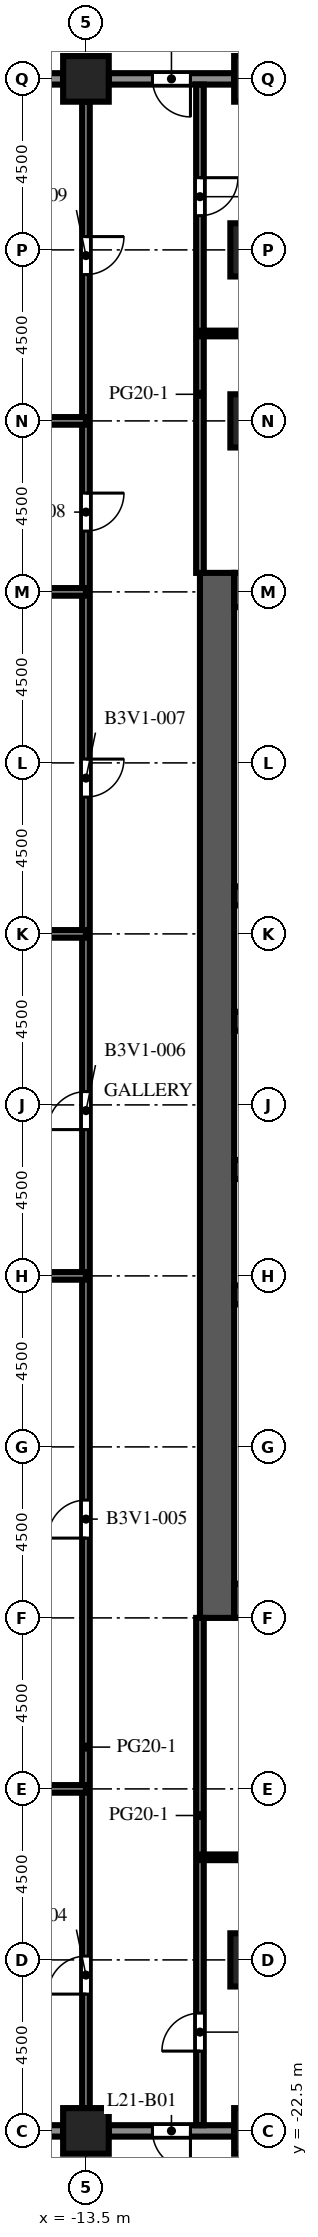
"""IFC4 building model, lengths in metres.
Left out: names, types, materials, properties, quantities, classifications, styles, units other than length and angle.
Written with IfcOpenShell. Run it as: python <this file> out.ifc"""

import sys

from ifc_helpers import new_model, si_unit, direction, frame, frame_2d, origin, origin_2d, place, context, subcontext, project, spatial, rectangle, extrude, element, fill, save


model = new_model("IFC4")
c1 = context("Model", 3, precision=1e-05, world=origin(), true_north=direction((0.0, 1.0)))
c2 = subcontext(c1, "Body", "Model", "MODEL_VIEW")
j1 = project(units=[si_unit("LENGTHUNIT", "METRE"), si_unit("PLANEANGLEUNIT", "RADIAN")], contexts=[c1])
p1 = place(None, origin())
s1 = spatial("IfcSite", under=j1, at=p1, CompositionType="ELEMENT")
p2 = place(p1, origin())
s2 = spatial("IfcBuilding", under=s1, at=p2, CompositionType="ELEMENT")
p3 = place(p2, frame((0.0, 0.0, 94.3)))
s3 = spatial("IfcBuildingStorey", under=s2, at=p3, CompositionType="ELEMENT", Elevation=94.3)
for number, where, z_axis, x_axis in (
    (1, (-13.5, -22.5, 0.0), (0.0, 0.0, 1.0), (1.0, 0.0, 0.0)),
    (2, (-13.5, 31.5, 0.0), (0.0, 0.0, 1.0), (1.0, 0.0, 0.0)),
    (3, (-9.0, -22.5, 0.0), (0.0, 0.0, 1.0), (1.0, 0.0, 0.0)),
    (4, (-9.0, 31.5, 0.0), (0.0, 0.0, 1.0), (1.0, 0.0, 0.0)),
):
    element("IfcColumn", number, at=place(p3, frame(where, z_axis=z_axis, x_axis=x_axis)), inside=s3, PredefinedType="COLUMN", context=c2, shape_type="SweptSolid", body=[
        extrude(rectangle(XDim=1.2, YDim=1.2, at=origin_2d()), origin(), (0.0, 0.0, 1.0), 4.1),
    ])
for number, where, z_axis, x_axis in (
    (5, (-9.0, -18.0, 0.0), (0.0, 0.0, 1.0), (1.0, 0.0, 0.0)),
    (6, (-9.0, 22.5, 0.0), (0.0, 0.0, 1.0), (1.0, 0.0, 0.0)),
    (7, (-9.0, 27.0, 0.0), (0.0, 0.0, 1.0), (1.0, 0.0, 0.0)),
):
    element("IfcColumn", number, at=place(p3, frame(where, z_axis=z_axis, x_axis=x_axis)), inside=s3, PredefinedType="COLUMN", context=c2, shape_type="SweptSolid", body=[
        extrude(rectangle(XDim=1.4, YDim=1.4, at=origin_2d()), origin(), (0.0, 0.0, 1.0), 4.1),
    ])
p4 = place(p3, frame((-10.05, -9.0, 0.0), z_axis=(0.0, 0.0, 1.0), x_axis=(0.0, 1.0, 0.0)))
e8 = element("IfcWall", 8, at=p4, inside=s3, PredefinedType="SHEAR", context=c2, shape_type="SweptSolid", body=[
    extrude(rectangle(XDim=27.5, YDim=0.9, at=frame_2d((13.75, 0.0))), origin(), (0.0, 0.0, 1.0), 4.1),
])
p5 = place(p4, frame((12.55, 0.0, 0.0)))
e9 = element("IfcOpeningElement", 9, at=p5, cuts=e8, PredefinedType="OPENING", context=c2, shape_type="SweptSolid", body=[
    extrude(rectangle(XDim=2.4, YDim=2.4, at=frame_2d((1.2, 1.2))), frame((0.0, 0.46, 0.0), z_axis=(0.0, -1.0, 0.0), x_axis=(1.0, 0.0, 0.0)), (0.0, 0.0, 1.0), 0.92),
])
p6 = place(p4, frame((6.825, 0.0, 0.0)))
e10 = element("IfcOpeningElement", 10, at=p6, cuts=e8, PredefinedType="OPENING", context=c2, shape_type="SweptSolid", body=[
    extrude(rectangle(XDim=1.2, YDim=2.1, at=frame_2d((0.6, 1.05))), frame((0.0, 0.46, 0.0), z_axis=(0.0, -1.0, 0.0), x_axis=(1.0, 0.0, 0.0)), (0.0, 0.0, 1.0), 0.92),
])
p7 = place(p4, frame((19.475, 0.0, 0.0)))
e11 = element("IfcOpeningElement", 11, at=p7, cuts=e8, PredefinedType="OPENING", context=c2, shape_type="SweptSolid", body=[
    extrude(rectangle(XDim=1.2, YDim=2.1, at=frame_2d((0.6, 1.05))), frame((0.0, 0.46, 0.0), z_axis=(0.0, -1.0, 0.0), x_axis=(1.0, 0.0, 0.0)), (0.0, 0.0, 1.0), 0.92),
])
for number, where, z_axis, x_axis in (
    (12, (-9.6, -8.55, 0.0), (0.0, 0.0, 1.0), (1.0, 0.0, 0.0)),
    (13, (-9.6, 18.05, 0.0), (0.0, 0.0, 1.0), (1.0, 0.0, 0.0)),
):
    element("IfcWall", number, at=place(p3, frame(where, z_axis=z_axis, x_axis=x_axis)), inside=s3, PredefinedType="SHEAR", context=c2, shape_type="SweptSolid", body=[
        extrude(rectangle(XDim=10.2, YDim=0.9, at=frame_2d((5.1, 0.0))), origin(), (0.0, 0.0, 1.0), 4.1),
    ])
p8 = place(p3, frame((-9.6, -0.5, 0.0), z_axis=(0.0, 0.0, 1.0), x_axis=(1.0, 0.0, 0.0)))
e14 = element("IfcWall", 14, at=p8, inside=s3, PredefinedType="SHEAR", context=c2, shape_type="SweptSolid", body=[
    extrude(rectangle(XDim=10.2, YDim=0.5, at=frame_2d((5.1, 0.0))), origin(), (0.0, 0.0, 1.0), 4.1),
])
p9 = place(p3, frame((-9.6, 2.8, 0.0), z_axis=(0.0, 0.0, 1.0), x_axis=(1.0, 0.0, 0.0)))
e15 = element("IfcWall", 15, at=p9, inside=s3, PredefinedType="SHEAR", context=c2, shape_type="SweptSolid", body=[
    extrude(rectangle(XDim=10.2, YDim=0.5, at=frame_2d((5.1, 0.0))), origin(), (0.0, 0.0, 1.0), 4.1),
])
p10 = place(p9, frame((0.562, 0.0, 0.0)))
e16 = element("IfcOpeningElement", 16, at=p10, cuts=e15, PredefinedType="OPENING", context=c2, shape_type="SweptSolid", body=[
    extrude(rectangle(XDim=1.1, YDim=2.1, at=frame_2d((0.55, 1.05))), frame((0.0, 0.26, 0.0), z_axis=(0.0, -1.0, 0.0), x_axis=(1.0, 0.0, 0.0)), (0.0, 0.0, 1.0), 0.52),
])
p11 = place(p9, frame((3.238, 0.0, 0.0)))
e17 = element("IfcOpeningElement", 17, at=p11, cuts=e15, PredefinedType="OPENING", context=c2, shape_type="SweptSolid", body=[
    extrude(rectangle(XDim=1.1, YDim=2.1, at=frame_2d((0.55, 1.05))), frame((0.0, 0.26, 0.0), z_axis=(0.0, -1.0, 0.0), x_axis=(1.0, 0.0, 0.0)), (0.0, 0.0, 1.0), 0.52),
])
p12 = place(p9, frame((8.538, 0.0, 0.0)))
e18 = element("IfcOpeningElement", 18, at=p12, cuts=e15, PredefinedType="OPENING", context=c2, shape_type="SweptSolid", body=[
    extrude(rectangle(XDim=1.1, YDim=2.1, at=frame_2d((0.55, 1.05))), frame((0.0, 0.26, 0.0), z_axis=(0.0, -1.0, 0.0), x_axis=(1.0, 0.0, 0.0)), (0.0, 0.0, 1.0), 0.52),
])
p13 = place(p3, frame((-9.6, 6.7, 0.0), z_axis=(0.0, 0.0, 1.0), x_axis=(1.0, 0.0, 0.0)))
e19 = element("IfcWall", 19, at=p13, inside=s3, PredefinedType="SHEAR", context=c2, shape_type="SweptSolid", body=[
    extrude(rectangle(XDim=10.2, YDim=0.5, at=frame_2d((5.1, 0.0))), origin(), (0.0, 0.0, 1.0), 4.1),
])
p14 = place(p13, frame((0.562, 0.0, 0.0)))
e20 = element("IfcOpeningElement", 20, at=p14, cuts=e19, PredefinedType="OPENING", context=c2, shape_type="SweptSolid", body=[
    extrude(rectangle(XDim=1.1, YDim=2.1, at=frame_2d((0.55, 1.05))), frame((0.0, 0.26, 0.0), z_axis=(0.0, -1.0, 0.0), x_axis=(1.0, 0.0, 0.0)), (0.0, 0.0, 1.0), 0.52),
])
p15 = place(p13, frame((3.288, 0.0, 0.0)))
e21 = element("IfcOpeningElement", 21, at=p15, cuts=e19, PredefinedType="OPENING", context=c2, shape_type="SweptSolid", body=[
    extrude(rectangle(XDim=1.0, YDim=2.1, at=frame_2d((0.5, 1.05))), frame((0.0, 0.26, 0.0), z_axis=(0.0, -1.0, 0.0), x_axis=(1.0, 0.0, 0.0)), (0.0, 0.0, 1.0), 0.52),
])
p16 = place(p13, frame((5.913, 0.0, 0.0)))
e22 = element("IfcOpeningElement", 22, at=p16, cuts=e19, PredefinedType="OPENING", context=c2, shape_type="SweptSolid", body=[
    extrude(rectangle(XDim=1.0, YDim=2.1, at=frame_2d((0.5, 1.05))), frame((0.0, 0.26, 0.0), z_axis=(0.0, -1.0, 0.0), x_axis=(1.0, 0.0, 0.0)), (0.0, 0.0, 1.0), 0.52),
])
p17 = place(p13, frame((8.587, 0.0, 0.0)))
e23 = element("IfcOpeningElement", 23, at=p17, cuts=e19, PredefinedType="OPENING", context=c2, shape_type="SweptSolid", body=[
    extrude(rectangle(XDim=1.0, YDim=2.1, at=frame_2d((0.5, 1.05))), frame((0.0, 0.26, 0.0), z_axis=(0.0, -1.0, 0.0), x_axis=(1.0, 0.0, 0.0)), (0.0, 0.0, 1.0), 0.52),
])
p18 = place(p3, frame((-9.6, 10.0, 0.0), z_axis=(0.0, 0.0, 1.0), x_axis=(1.0, 0.0, 0.0)))
e24 = element("IfcWall", 24, at=p18, inside=s3, PredefinedType="SHEAR", context=c2, shape_type="SweptSolid", body=[
    extrude(rectangle(XDim=10.2, YDim=0.5, at=frame_2d((5.1, 0.0))), origin(), (0.0, 0.0, 1.0), 4.1),
])
p19 = place(p3, frame((-14.1, -22.5, 0.0), z_axis=(0.0, 0.0, 1.0), x_axis=(-1.0, 0.0, 0.0)))
e25 = element("IfcWall", 25, at=p19, inside=s3, PredefinedType="SOLIDWALL", context=c2, shape_type="SweptSolid", body=[
    extrude(rectangle(XDim=3.3, YDim=0.3, at=frame_2d((1.65, 0.0))), origin(), (0.0, 0.0, 1.0), 2.75),
])
p20 = place(p19, frame((0.45, 0.0, 0.8)))
e26 = element("IfcOpeningElement", 26, at=p20, cuts=e25, PredefinedType="OPENING", context=c2, shape_type="SweptSolid", body=[
    extrude(rectangle(XDim=2.4, YDim=1.7, at=frame_2d((1.2, 0.85))), frame((0.0, 0.16, 0.0), z_axis=(0.0, -1.0, 0.0), x_axis=(1.0, 0.0, 0.0)), (0.0, 0.0, 1.0), 0.32),
])
p21 = place(p3, frame((-9.6, -22.5, 0.0), z_axis=(0.0, 0.0, 1.0), x_axis=(-1.0, 0.0, 0.0)))
e27 = element("IfcWall", 27, at=p21, inside=s3, PredefinedType="SOLIDWALL", context=c2, shape_type="SweptSolid", body=[
    extrude(rectangle(XDim=3.3, YDim=0.3, at=frame_2d((1.65, 0.0))), origin(), (0.0, 0.0, 1.0), 2.75),
])
p22 = place(p21, frame((1.15, 0.0, 0.0)))
e28 = element("IfcOpeningElement", 28, at=p22, cuts=e27, PredefinedType="OPENING", context=c2, shape_type="SweptSolid", body=[
    extrude(rectangle(XDim=1.0, YDim=2.2, at=frame_2d((0.5, 1.1))), frame((0.0, 0.16, 0.0), z_axis=(0.0, -1.0, 0.0), x_axis=(1.0, 0.0, 0.0)), (0.0, 0.0, 1.0), 0.32),
])
p23 = place(p3, frame((-12.9, 31.5, 0.0), z_axis=(0.0, 0.0, 1.0), x_axis=(1.0, 0.0, 0.0)))
e29 = element("IfcWall", 29, at=p23, inside=s3, PredefinedType="SOLIDWALL", context=c2, shape_type="SweptSolid", body=[
    extrude(rectangle(XDim=3.3, YDim=0.3, at=frame_2d((1.65, 0.0))), origin(), (0.0, 0.0, 1.0), 2.75),
])
p24 = place(p23, frame((1.15, 0.0, 0.0)))
e30 = element("IfcOpeningElement", 30, at=p24, cuts=e29, PredefinedType="OPENING", context=c2, shape_type="SweptSolid", body=[
    extrude(rectangle(XDim=1.0, YDim=2.2, at=frame_2d((0.5, 1.1))), frame((0.0, 0.16, 0.0), z_axis=(0.0, -1.0, 0.0), x_axis=(1.0, 0.0, 0.0)), (0.0, 0.0, 1.0), 0.32),
])
p25 = place(p3, frame((-17.4, 31.5, 0.0), z_axis=(0.0, 0.0, 1.0), x_axis=(1.0, 0.0, 0.0)))
e31 = element("IfcWall", 31, at=p25, inside=s3, PredefinedType="SOLIDWALL", context=c2, shape_type="SweptSolid", body=[
    extrude(rectangle(XDim=3.3, YDim=0.3, at=frame_2d((1.65, 0.0))), origin(), (0.0, 0.0, 1.0), 2.75),
])
p26 = place(p25, frame((0.45, 0.0, 0.8)))
e32 = element("IfcOpeningElement", 32, at=p26, cuts=e31, PredefinedType="OPENING", context=c2, shape_type="SweptSolid", body=[
    extrude(rectangle(XDim=2.4, YDim=1.7, at=frame_2d((1.2, 0.85))), frame((0.0, 0.16, 0.0), z_axis=(0.0, -1.0, 0.0), x_axis=(1.0, 0.0, 0.0)), (0.0, 0.0, 1.0), 0.32),
])
p27 = place(p3, frame((-13.5, -21.9, 0.0), z_axis=(0.0, 0.0, 1.0), x_axis=(0.0, 1.0, 0.0)))
e33 = element("IfcWall", 33, at=p27, inside=s3, PredefinedType="PARTITIONING", context=c2, shape_type="SweptSolid", body=[
    extrude(rectangle(XDim=52.8, YDim=0.2, at=frame_2d((26.4, 0.0))), origin(), (0.0, 0.0, 1.0), 3.65),
])
p28 = place(p27, frame((3.0, 0.0, 0.0)))
e34 = element("IfcOpeningElement", 34, at=p28, cuts=e33, PredefinedType="OPENING", context=c2, shape_type="SweptSolid", body=[
    extrude(rectangle(XDim=1.0, YDim=2.1, at=frame_2d((0.5, 1.05))), frame((0.0, 0.11, 0.0), z_axis=(0.0, -1.0, 0.0), x_axis=(1.0, 0.0, 0.0)), (0.0, 0.0, 1.0), 0.22),
])
p29 = place(p27, frame((15.0, 0.0, 0.0)))
e35 = element("IfcOpeningElement", 35, at=p29, cuts=e33, PredefinedType="OPENING", context=c2, shape_type="SweptSolid", body=[
    extrude(rectangle(XDim=1.0, YDim=2.1, at=frame_2d((0.5, 1.05))), frame((0.0, 0.11, 0.0), z_axis=(0.0, -1.0, 0.0), x_axis=(1.0, 0.0, 0.0)), (0.0, 0.0, 1.0), 0.22),
])
p30 = place(p27, frame((25.75, 0.0, 0.0)))
e36 = element("IfcOpeningElement", 36, at=p30, cuts=e33, PredefinedType="OPENING", context=c2, shape_type="SweptSolid", body=[
    extrude(rectangle(XDim=1.0, YDim=2.1, at=frame_2d((0.5, 1.05))), frame((0.0, 0.11, 0.0), z_axis=(0.0, -1.0, 0.0), x_axis=(1.0, 0.0, 0.0)), (0.0, 0.0, 1.0), 0.22),
])
p31 = place(p27, frame((34.5, 0.0, 0.0)))
e37 = element("IfcOpeningElement", 37, at=p31, cuts=e33, PredefinedType="OPENING", context=c2, shape_type="SweptSolid", body=[
    extrude(rectangle(XDim=1.0, YDim=2.1, at=frame_2d((0.5, 1.05))), frame((0.0, 0.11, 0.0), z_axis=(0.0, -1.0, 0.0), x_axis=(1.0, 0.0, 0.0)), (0.0, 0.0, 1.0), 0.22),
])
p32 = place(p27, frame((41.5, 0.0, 0.0)))
e38 = element("IfcOpeningElement", 38, at=p32, cuts=e33, PredefinedType="OPENING", context=c2, shape_type="SweptSolid", body=[
    extrude(rectangle(XDim=1.0, YDim=2.1, at=frame_2d((0.5, 1.05))), frame((0.0, 0.11, 0.0), z_axis=(0.0, -1.0, 0.0), x_axis=(1.0, 0.0, 0.0)), (0.0, 0.0, 1.0), 0.22),
])
p33 = place(p27, frame((48.25, 0.0, 0.0)))
e39 = element("IfcOpeningElement", 39, at=p33, cuts=e33, PredefinedType="OPENING", context=c2, shape_type="SweptSolid", body=[
    extrude(rectangle(XDim=1.0, YDim=2.1, at=frame_2d((0.5, 1.05))), frame((0.0, 0.11, 0.0), z_axis=(0.0, -1.0, 0.0), x_axis=(1.0, 0.0, 0.0)), (0.0, 0.0, 1.0), 0.22),
])
p34 = place(p3, frame((-10.5, -9.0, 0.0), z_axis=(0.0, 0.0, 1.0), x_axis=(0.0, -1.0, 0.0)))
e40 = element("IfcWall", 40, at=p34, inside=s3, PredefinedType="PARTITIONING", context=c2, shape_type="SweptSolid", body=[
    extrude(rectangle(XDim=13.35, YDim=0.2, at=frame_2d((6.675, 0.0))), origin(), (0.0, 0.0, 1.0), 3.65),
])
p35 = place(p34, frame((10.4, 0.0, 0.0)))
e41 = element("IfcOpeningElement", 41, at=p35, cuts=e40, PredefinedType="OPENING", context=c2, shape_type="SweptSolid", body=[
    extrude(rectangle(XDim=1.0, YDim=2.1, at=frame_2d((0.5, 1.05))), frame((0.0, 0.11, 0.0), z_axis=(0.0, -1.0, 0.0), x_axis=(1.0, 0.0, 0.0)), (0.0, 0.0, 1.0), 0.22),
])
p36 = place(p3, frame((-10.5, 31.35, 0.0), z_axis=(0.0, 0.0, 1.0), x_axis=(0.0, -1.0, 0.0)))
e42 = element("IfcWall", 42, at=p36, inside=s3, PredefinedType="PARTITIONING", context=c2, shape_type="SweptSolid", body=[
    extrude(rectangle(XDim=12.85, YDim=0.2, at=frame_2d((6.425, 0.0))), origin(), (0.0, 0.0, 1.0), 3.65),
])
p37 = place(p36, frame((2.45, 0.0, 0.0)))
e43 = element("IfcOpeningElement", 43, at=p37, cuts=e42, PredefinedType="OPENING", context=c2, shape_type="SweptSolid", body=[
    extrude(rectangle(XDim=1.0, YDim=2.1, at=frame_2d((0.5, 1.05))), frame((0.0, 0.11, 0.0), z_axis=(0.0, -1.0, 0.0), x_axis=(1.0, 0.0, 0.0)), (0.0, 0.0, 1.0), 0.22),
])
p38 = place(p3, frame((-10.5, -15.3, 0.0), z_axis=(0.0, 0.0, 1.0), x_axis=(1.0, 0.0, 0.0)))
e44 = element("IfcWall", 44, at=p38, inside=s3, PredefinedType="PARTITIONING", context=c2, shape_type="SweptSolid", body=[
    extrude(rectangle(XDim=28.5, YDim=0.15, at=frame_2d((14.25, 0.0))), origin(), (0.0, 0.0, 1.0), 3.65),
])
p39 = place(p38, frame((5.35, 0.0, 0.0)))
e45 = element("IfcOpeningElement", 45, at=p39, cuts=e44, PredefinedType="OPENING", context=c2, shape_type="SweptSolid", body=[
    extrude(rectangle(XDim=1.0, YDim=2.1, at=frame_2d((0.5, 1.05))), frame((0.0, 0.085, 0.0), z_axis=(0.0, -1.0, 0.0), x_axis=(1.0, 0.0, 0.0)), (0.0, 0.0, 1.0), 0.17),
])
p40 = place(p38, frame((18.1, 0.0, 0.0)))
e46 = element("IfcOpeningElement", 46, at=p40, cuts=e44, PredefinedType="OPENING", context=c2, shape_type="SweptSolid", body=[
    extrude(rectangle(XDim=1.0, YDim=2.1, at=frame_2d((0.5, 1.05))), frame((0.0, 0.085, 0.0), z_axis=(0.0, -1.0, 0.0), x_axis=(1.0, 0.0, 0.0)), (0.0, 0.0, 1.0), 0.17),
])
p41 = place(p38, frame((26.1, 0.0, 0.0)))
e47 = element("IfcOpeningElement", 47, at=p41, cuts=e44, PredefinedType="OPENING", context=c2, shape_type="SweptSolid", body=[
    extrude(rectangle(XDim=1.0, YDim=2.1, at=frame_2d((0.5, 1.05))), frame((0.0, 0.085, 0.0), z_axis=(0.0, -1.0, 0.0), x_axis=(1.0, 0.0, 0.0)), (0.0, 0.0, 1.0), 0.17),
])
p42 = place(p3, frame((-21.9, -13.5, 0.0), z_axis=(0.0, 0.0, 1.0), x_axis=(1.0, 0.0, 0.0)))
e48 = element("IfcWall", 48, at=p42, inside=s3, PredefinedType="PARTITIONING", context=c2, shape_type="SweptSolid", body=[
    extrude(rectangle(XDim=8.4, YDim=0.2, at=frame_2d((4.2, 0.0))), origin(), (0.0, 0.0, 1.0), 3.65),
])
for number, where, z_axis, x_axis in (
    (49, (-17.3, 0.0, 0.0), (0.0, 0.0, 1.0), (1.0, 0.0, 0.0)),
    (50, (-17.3, 9.0, 0.0), (0.0, 0.0, 1.0), (1.0, 0.0, 0.0)),
    (51, (-17.3, 18.0, 0.0), (0.0, 0.0, 1.0), (1.0, 0.0, 0.0)),
    (52, (-17.3, 22.5, 0.0), (0.0, 0.0, 1.0), (1.0, 0.0, 0.0)),
):
    element("IfcWall", number, at=place(p3, frame(where, z_axis=z_axis, x_axis=x_axis)), inside=s3, PredefinedType="PARTITIONING", context=c2, shape_type="SweptSolid", body=[
        extrude(rectangle(XDim=3.8, YDim=0.2, at=frame_2d((1.9, 0.0))), origin(), (0.0, 0.0, 1.0), 3.65),
    ])
p43 = place(p3, frame((18.0, 24.8, 0.0), z_axis=(0.0, 0.0, 1.0), x_axis=(-1.0, 0.0, 0.0)))
e53 = element("IfcWall", 53, at=p43, inside=s3, PredefinedType="PARTITIONING", context=c2, shape_type="SweptSolid", body=[
    extrude(rectangle(XDim=28.5, YDim=0.15, at=frame_2d((14.25, 0.0))), origin(), (0.0, 0.0, 1.0), 3.65),
])
p44 = place(p43, frame((23.65, 0.0, 0.0)))
e54 = element("IfcOpeningElement", 54, at=p44, cuts=e53, PredefinedType="OPENING", context=c2, shape_type="SweptSolid", body=[
    extrude(rectangle(XDim=1.0, YDim=2.1, at=frame_2d((0.5, 1.05))), frame((0.0, 0.085, 0.0), z_axis=(0.0, -1.0, 0.0), x_axis=(1.0, 0.0, 0.0)), (0.0, 0.0, 1.0), 0.17),
])
p45 = place(p43, frame((12.65, 0.0, 0.0)))
e55 = element("IfcOpeningElement", 55, at=p45, cuts=e53, PredefinedType="OPENING", context=c2, shape_type="SweptSolid", body=[
    extrude(rectangle(XDim=1.0, YDim=2.1, at=frame_2d((0.5, 1.05))), frame((0.0, 0.085, 0.0), z_axis=(0.0, -1.0, 0.0), x_axis=(1.0, 0.0, 0.0)), (0.0, 0.0, 1.0), 0.17),
])
p46 = place(p43, frame((1.9, 0.0, 0.0)))
e56 = element("IfcOpeningElement", 56, at=p46, cuts=e53, PredefinedType="OPENING", context=c2, shape_type="SweptSolid", body=[
    extrude(rectangle(XDim=1.0, YDim=2.1, at=frame_2d((0.5, 1.05))), frame((0.0, 0.085, 0.0), z_axis=(0.0, -1.0, 0.0), x_axis=(1.0, 0.0, 0.0)), (0.0, 0.0, 1.0), 0.17),
])
p47 = place(p22, origin())
e57 = element("IfcDoor", 57, at=p47, inside=s3, OperationType="SINGLE_SWING_LEFT", PredefinedType="DOOR", context=c2, shape_type="SweptSolid", body=[
    extrude(rectangle(XDim=1.0, YDim=2.2, at=frame_2d((0.5, 1.1))), frame((0.0, 0.025, 0.0), z_axis=(0.0, -1.0, 0.0), x_axis=(1.0, 0.0, 0.0)), (0.0, 0.0, 1.0), 0.05),
])
fill(e28, e57)
p48 = place(p24, origin())
e58 = element("IfcDoor", 58, at=p48, inside=s3, OperationType="SINGLE_SWING_RIGHT", PredefinedType="DOOR", context=c2, shape_type="SweptSolid", body=[
    extrude(rectangle(XDim=1.0, YDim=2.2, at=frame_2d((0.5, 1.1))), frame((0.0, 0.025, 0.0), z_axis=(0.0, -1.0, 0.0), x_axis=(1.0, 0.0, 0.0)), (0.0, 0.0, 1.0), 0.05),
])
fill(e30, e58)
p49 = place(p5, origin())
e59 = element("IfcDoor", 59, at=p49, inside=s3, OperationType="DOUBLE_DOOR_DOUBLE_SWING", PredefinedType="DOOR", context=c2, shape_type="SweptSolid", body=[
    extrude(rectangle(XDim=2.4, YDim=2.4, at=frame_2d((1.2, 1.2))), frame((0.0, 0.025, 0.0), z_axis=(0.0, -1.0, 0.0), x_axis=(1.0, 0.0, 0.0)), (0.0, 0.0, 1.0), 0.05),
])
fill(e9, e59)
p50 = place(p6, origin())
e60 = element("IfcDoor", 60, at=p50, inside=s3, OperationType="SINGLE_SWING_LEFT", PredefinedType="DOOR", context=c2, shape_type="SweptSolid", body=[
    extrude(rectangle(XDim=1.2, YDim=2.1, at=frame_2d((0.6, 1.05))), frame((0.0, 0.025, 0.0), z_axis=(0.0, -1.0, 0.0), x_axis=(1.0, 0.0, 0.0)), (0.0, 0.0, 1.0), 0.05),
])
fill(e10, e60)
p51 = place(p7, origin())
e61 = element("IfcDoor", 61, at=p51, inside=s3, OperationType="SINGLE_SWING_LEFT", PredefinedType="DOOR", context=c2, shape_type="SweptSolid", body=[
    extrude(rectangle(XDim=1.2, YDim=2.1, at=frame_2d((0.6, 1.05))), frame((0.0, 0.025, 0.0), z_axis=(0.0, -1.0, 0.0), x_axis=(1.0, 0.0, 0.0)), (0.0, 0.0, 1.0), 0.05),
])
fill(e11, e61)
p52 = place(p28, origin())
e62 = element("IfcDoor", 62, at=p52, inside=s3, OperationType="SINGLE_SWING_LEFT", PredefinedType="DOOR", context=c2, shape_type="SweptSolid", body=[
    extrude(rectangle(XDim=1.0, YDim=2.1, at=frame_2d((0.5, 1.05))), frame((0.0, 0.025, 0.0), z_axis=(0.0, -1.0, 0.0), x_axis=(1.0, 0.0, 0.0)), (0.0, 0.0, 1.0), 0.05),
])
fill(e34, e62)
p53 = place(p29, origin())
e63 = element("IfcDoor", 63, at=p53, inside=s3, OperationType="SINGLE_SWING_LEFT", PredefinedType="DOOR", context=c2, shape_type="SweptSolid", body=[
    extrude(rectangle(XDim=1.0, YDim=2.1, at=frame_2d((0.5, 1.05))), frame((0.0, 0.025, 0.0), z_axis=(0.0, -1.0, 0.0), x_axis=(1.0, 0.0, 0.0)), (0.0, 0.0, 1.0), 0.05),
])
fill(e35, e63)
p54 = place(p30, origin())
e64 = element("IfcDoor", 64, at=p54, inside=s3, OperationType="SINGLE_SWING_LEFT", PredefinedType="DOOR", context=c2, shape_type="SweptSolid", body=[
    extrude(rectangle(XDim=1.0, YDim=2.1, at=frame_2d((0.5, 1.05))), frame((0.0, 0.025, 0.0), z_axis=(0.0, -1.0, 0.0), x_axis=(1.0, 0.0, 0.0)), (0.0, 0.0, 1.0), 0.05),
])
fill(e36, e64)
p55 = place(p31, origin())
e65 = element("IfcDoor", 65, at=p55, inside=s3, OperationType="SINGLE_SWING_RIGHT", PredefinedType="DOOR", context=c2, shape_type="SweptSolid", body=[
    extrude(rectangle(XDim=1.0, YDim=2.1, at=frame_2d((0.5, 1.05))), frame((0.0, 0.025, 0.0), z_axis=(0.0, -1.0, 0.0), x_axis=(1.0, 0.0, 0.0)), (0.0, 0.0, 1.0), 0.05),
])
fill(e37, e65)
p56 = place(p32, origin())
e66 = element("IfcDoor", 66, at=p56, inside=s3, OperationType="SINGLE_SWING_RIGHT", PredefinedType="DOOR", context=c2, shape_type="SweptSolid", body=[
    extrude(rectangle(XDim=1.0, YDim=2.1, at=frame_2d((0.5, 1.05))), frame((0.0, 0.025, 0.0), z_axis=(0.0, -1.0, 0.0), x_axis=(1.0, 0.0, 0.0)), (0.0, 0.0, 1.0), 0.05),
])
fill(e38, e66)
p57 = place(p33, origin())
e67 = element("IfcDoor", 67, at=p57, inside=s3, OperationType="SINGLE_SWING_RIGHT", PredefinedType="DOOR", context=c2, shape_type="SweptSolid", body=[
    extrude(rectangle(XDim=1.0, YDim=2.1, at=frame_2d((0.5, 1.05))), frame((0.0, 0.025, 0.0), z_axis=(0.0, -1.0, 0.0), x_axis=(1.0, 0.0, 0.0)), (0.0, 0.0, 1.0), 0.05),
])
fill(e39, e67)
p58 = place(p35, origin())
e68 = element("IfcDoor", 68, at=p58, inside=s3, OperationType="SINGLE_SWING_RIGHT", PredefinedType="DOOR", context=c2, shape_type="SweptSolid", body=[
    extrude(rectangle(XDim=1.0, YDim=2.1, at=frame_2d((0.5, 1.05))), frame((0.0, 0.025, 0.0), z_axis=(0.0, -1.0, 0.0), x_axis=(1.0, 0.0, 0.0)), (0.0, 0.0, 1.0), 0.05),
])
fill(e41, e68)
p59 = place(p37, origin())
e69 = element("IfcDoor", 69, at=p59, inside=s3, OperationType="SINGLE_SWING_LEFT", PredefinedType="DOOR", context=c2, shape_type="SweptSolid", body=[
    extrude(rectangle(XDim=1.0, YDim=2.1, at=frame_2d((0.5, 1.05))), frame((0.0, 0.025, 0.0), z_axis=(0.0, -1.0, 0.0), x_axis=(1.0, 0.0, 0.0)), (0.0, 0.0, 1.0), 0.05),
])
fill(e43, e69)
save(model, sys.argv[1])
